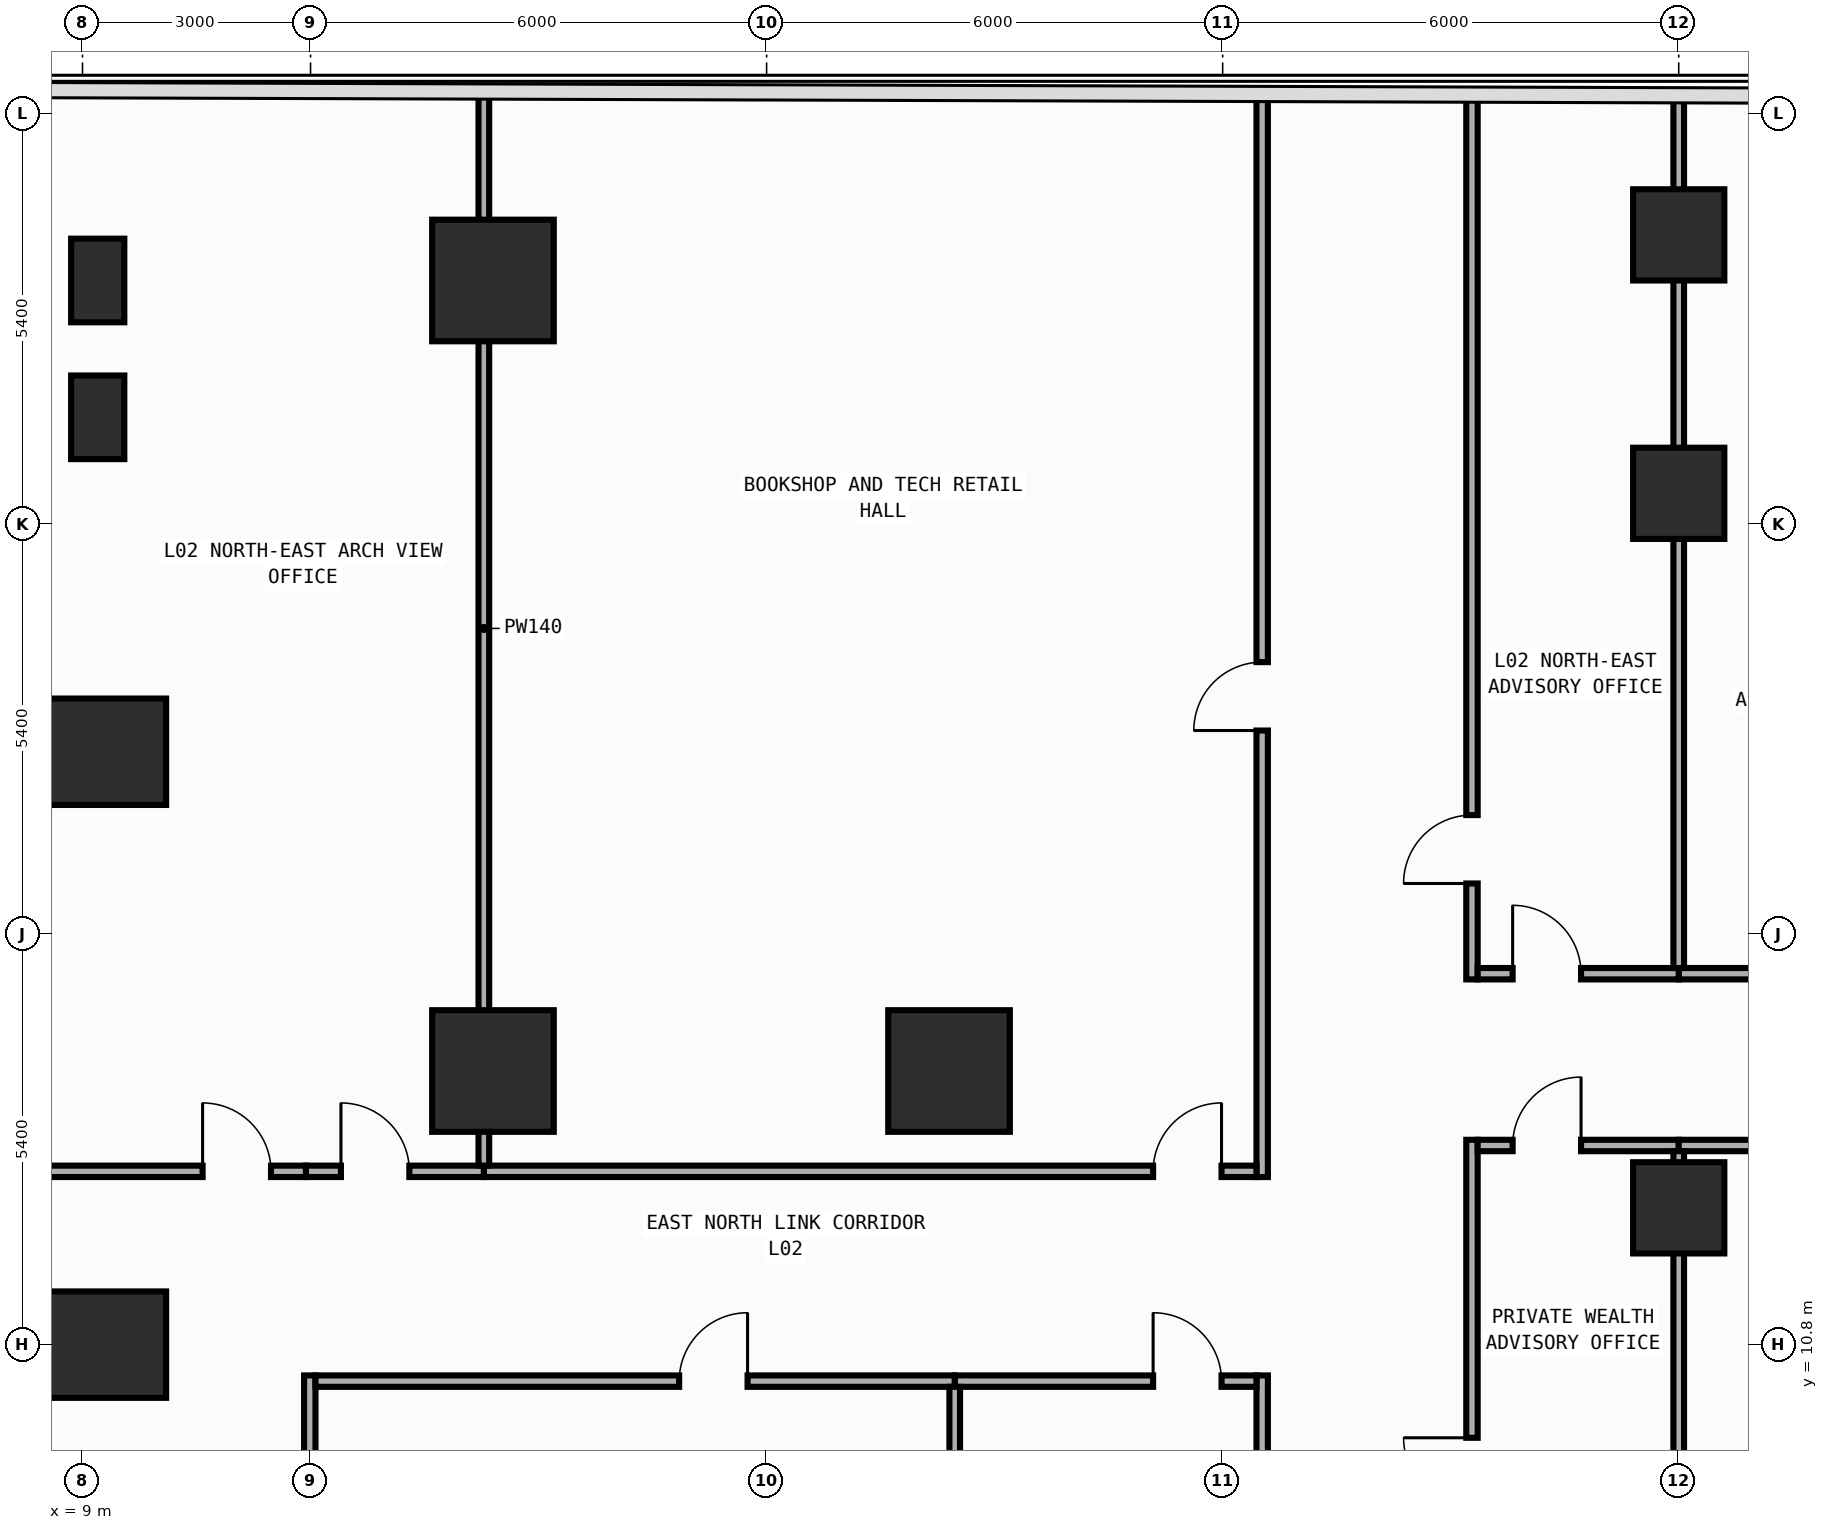
"""IFC4 building model, lengths in metres.
Left out: names, types, materials, properties, quantities, classifications, styles, units other than length and angle.
Written with IfcOpenShell. Run it as: python <this file> out.ifc"""

import sys

from ifc_helpers import new_model, si_unit, direction, frame, frame_2d, origin, origin_2d, place, context, subcontext, project, spatial, rectangle, extrude, element, fill, save


model = new_model("IFC4")
c1 = context("Model", 3, precision=1e-05, world=origin(), true_north=direction((0.0, 1.0)))
c2 = subcontext(c1, "Body", "Model", "MODEL_VIEW")
j1 = project(units=[si_unit("LENGTHUNIT", "METRE"), si_unit("PLANEANGLEUNIT", "RADIAN")], contexts=[c1])
p1 = place(None, origin())
s1 = spatial("IfcSite", under=j1, at=p1, CompositionType="ELEMENT")
p2 = place(p1, origin())
s2 = spatial("IfcBuilding", under=s1, at=p2, CompositionType="ELEMENT")
p3 = place(p2, frame((0.0, 0.0, 6.0)))
s3 = spatial("IfcBuildingStorey", under=s2, at=p3, CompositionType="ELEMENT", Elevation=6.0)
for number, where, z_axis, x_axis in (
    (1, (9.2, 10.8, 0.0), (0.0, 0.0, 1.0), (1.0, 0.0, 0.0)),
    (2, (9.2, 18.6, 0.0), (0.0, 0.0, 1.0), (1.0, 0.0, 0.0)),
):
    element("IfcColumn", number, at=place(p3, frame(where, z_axis=z_axis, x_axis=x_axis)), inside=s3, PredefinedType="COLUMN", context=c2, shape_type="SweptSolid", body=[
        extrude(rectangle(XDim=1.8, YDim=1.4, at=origin_2d()), origin(), (0.0, 0.0, 1.0), 5.0),
    ])
for number, where, z_axis, x_axis in (
    (3, (20.4, 14.4, 0.0), (0.0, 0.0, 1.0), (1.0, 0.0, 0.0)),
    (4, (14.4, 14.4, 0.0), (0.0, 0.0, 1.0), (1.0, 0.0, 0.0)),
):
    element("IfcColumn", number, at=place(p3, frame(where, z_axis=z_axis, x_axis=x_axis)), inside=s3, PredefinedType="COLUMN", context=c2, shape_type="SweptSolid", body=[
        extrude(rectangle(XDim=1.6, YDim=1.6, at=origin_2d()), origin(), (0.0, 0.0, 1.0), 5.0),
    ])
for number, where, z_axis, x_axis in (
    (5, (30.0, 12.6, 0.0), (0.0, 0.0, 1.0), (1.0, 0.0, 0.0)),
    (6, (30.0, 22.0, 0.0), (0.0, 0.0, 1.0), (1.0, 0.0, 0.0)),
    (7, (30.0, 25.4, 0.0), (0.0, 0.0, 1.0), (1.0, 0.0, 0.0)),
):
    element("IfcColumn", number, at=place(p3, frame(where, z_axis=z_axis, x_axis=x_axis)), inside=s3, PredefinedType="COLUMN", context=c2, shape_type="SweptSolid", body=[
        extrude(rectangle(XDim=1.2, YDim=1.2, at=origin_2d()), origin(), (0.0, 0.0, 1.0), 5.0),
    ])
p4 = place(p3, frame((9.2, 24.8, 0.0), z_axis=(0.0, 0.0, 1.0), x_axis=(1.0, 0.0, 0.0)))
e8 = element("IfcColumn", 8, at=p4, inside=s3, PredefinedType="PILASTER", context=c2, shape_type="SweptSolid", body=[
    extrude(rectangle(XDim=0.7, YDim=1.1, at=origin_2d()), origin(), (0.0, 0.0, 1.0), 5.0),
])
p5 = place(p3, frame((14.4, 24.8, 0.0), z_axis=(0.0, 0.0, 1.0), x_axis=(1.0, 0.0, 0.0)))
e9 = element("IfcColumn", 9, at=p5, inside=s3, PredefinedType="COLUMN", context=c2, shape_type="SweptSolid", body=[
    extrude(rectangle(XDim=1.6, YDim=1.6, at=origin_2d()), origin(), (0.0, 0.0, 1.0), 5.0),
])
p6 = place(p3, frame((9.2, 23.0, 0.0), z_axis=(0.0, 0.0, 1.0), x_axis=(1.0, 0.0, 0.0)))
e10 = element("IfcColumn", 10, at=p6, inside=s3, PredefinedType="PILASTER", context=c2, shape_type="SweptSolid", body=[
    extrude(rectangle(XDim=0.7, YDim=1.1, at=origin_2d()), origin(), (0.0, 0.0, 1.0), 5.0),
])
p7 = place(p3, frame((11.99, 7.2, 0.0), z_axis=(0.0, 0.0, 1.0), x_axis=(0.0, 1.0, 0.0)))
e11 = element("IfcWall", 11, at=p7, inside=s3, PredefinedType="PARTITIONING", context=c2, shape_type="SweptSolid", body=[
    extrude(rectangle(XDim=3.195, YDim=0.15, at=frame_2d((1.598, 0.0))), origin(), (0.0, 0.0, 1.0), 4.7),
])
p8 = place(p7, frame((0.689, 0.0, 0.0)))
e12 = element("IfcOpeningElement", 12, at=p8, cuts=e11, PredefinedType="OPENING", context=c2, shape_type="SweptSolid", body=[
    extrude(rectangle(XDim=0.9, YDim=2.15, at=frame_2d((0.45, 1.075))), frame((0.0, 0.085, 0.0), z_axis=(0.0, -1.0, 0.0), x_axis=(1.0, 0.0, 0.0)), (0.0, 0.0, 1.0), 0.17),
])
p9 = place(p3, frame((8.205, 13.08, 0.0), z_axis=(0.0, 0.0, 1.0), x_axis=(1.0, 0.0, 0.0)))
e13 = element("IfcWall", 13, at=p9, inside=s3, PredefinedType="PARTITIONING", context=c2, shape_type="SweptSolid", body=[
    extrude(rectangle(XDim=3.735, YDim=0.15, at=frame_2d((1.867, 0.0))), origin(), (0.0, 0.0, 1.0), 4.7),
])
p10 = place(p9, frame((2.375, 0.0, 0.0)))
e14 = element("IfcOpeningElement", 14, at=p10, cuts=e13, PredefinedType="OPENING", context=c2, shape_type="SweptSolid", body=[
    extrude(rectangle(XDim=0.9, YDim=2.15, at=frame_2d((0.45, 1.075))), frame((0.0, 0.085, 0.0), z_axis=(0.0, -1.0, 0.0), x_axis=(1.0, 0.0, 0.0)), (0.0, 0.0, 1.0), 0.17),
])
p11 = place(p3, frame((27.28, 5.365, 0.0), z_axis=(0.0, 0.0, 1.0), x_axis=(0.0, 1.0, 0.0)))
e15 = element("IfcWall", 15, at=p11, inside=s3, PredefinedType="PARTITIONING", context=c2, shape_type="SweptSolid", body=[
    extrude(rectangle(XDim=8.13, YDim=0.15, at=frame_2d((4.065, 0.0))), origin(), (0.0, 0.0, 1.0), 4.7),
])
p12 = place(p11, frame((3.31, 0.0, 0.0)))
e16 = element("IfcOpeningElement", 16, at=p12, cuts=e15, PredefinedType="OPENING", context=c2, shape_type="SweptSolid", body=[
    extrude(rectangle(XDim=0.9, YDim=2.15, at=frame_2d((0.45, 1.075))), frame((0.0, 0.085, 0.0), z_axis=(0.0, -1.0, 0.0), x_axis=(1.0, 0.0, 0.0)), (0.0, 0.0, 1.0), 0.17),
])
p13 = place(p3, frame((24.52, 13.005, 0.0), z_axis=(0.0, 0.0, 1.0), x_axis=(0.0, 1.0, 0.0)))
e17 = element("IfcWall", 17, at=p13, inside=s3, PredefinedType="PARTITIONING", context=c2, shape_type="SweptSolid", body=[
    extrude(rectangle(XDim=14.253, YDim=0.15, at=frame_2d((7.126, 0.0))), origin(), (0.0, 0.0, 1.0), 4.7),
])
p14 = place(p13, frame((5.874, 0.0, 0.0)))
e18 = element("IfcOpeningElement", 18, at=p14, cuts=e17, PredefinedType="OPENING", context=c2, shape_type="SweptSolid", body=[
    extrude(rectangle(XDim=0.9, YDim=2.15, at=frame_2d((0.45, 1.075))), frame((0.0, 0.085, 0.0), z_axis=(0.0, -1.0, 0.0), x_axis=(1.0, 0.0, 0.0)), (0.0, 0.0, 1.0), 0.17),
])
p15 = place(p3, frame((24.52, -20.88, 0.0), z_axis=(0.0, 0.0, 1.0), x_axis=(0.0, 1.0, 0.0)))
e19 = element("IfcWall", 19, at=p15, inside=s3, PredefinedType="PARTITIONING", context=c2, shape_type="SweptSolid", body=[
    extrude(rectangle(XDim=31.275, YDim=0.15, at=frame_2d((15.637, 0.0))), origin(), (0.0, 0.0, 1.0), 4.7),
])
p16 = place(p15, frame((15.087, 0.0, 0.0)))
e20 = element("IfcOpeningElement", 20, at=p16, cuts=e19, PredefinedType="OPENING", context=c2, shape_type="SweptSolid", body=[
    extrude(rectangle(XDim=0.9, YDim=2.15, at=frame_2d((0.45, 1.075))), frame((0.0, 0.085, 0.0), z_axis=(0.0, -1.0, 0.0), x_axis=(1.0, 0.0, 0.0)), (0.0, 0.0, 1.0), 0.17),
])
p17 = place(p3, frame((27.28, 15.605, 0.0), z_axis=(0.0, 0.0, 1.0), x_axis=(0.0, 1.0, 0.0)))
e21 = element("IfcWall", 21, at=p17, inside=s3, PredefinedType="PARTITIONING", context=c2, shape_type="SweptSolid", body=[
    extrude(rectangle(XDim=11.644, YDim=0.15, at=frame_2d((5.822, 0.0))), origin(), (0.0, 0.0, 1.0), 4.7),
])
p18 = place(p17, frame((1.262, 0.0, 0.0)))
e22 = element("IfcOpeningElement", 22, at=p18, cuts=e21, PredefinedType="OPENING", context=c2, shape_type="SweptSolid", body=[
    extrude(rectangle(XDim=0.9, YDim=2.15, at=frame_2d((0.45, 1.075))), frame((0.0, 0.085, 0.0), z_axis=(0.0, -1.0, 0.0), x_axis=(1.0, 0.0, 0.0)), (0.0, 0.0, 1.0), 0.17),
])
p19 = place(p3, frame((27.355, 13.42, 0.0), z_axis=(0.0, 0.0, 1.0), x_axis=(1.0, 0.0, 0.0)))
e23 = element("IfcWall", 23, at=p19, inside=s3, PredefinedType="PARTITIONING", context=c2, shape_type="SweptSolid", body=[
    extrude(rectangle(XDim=2.645, YDim=0.15, at=frame_2d((1.323, 0.0))), origin(), (0.0, 0.0, 1.0), 4.7),
])
p20 = place(p19, frame((0.46, 0.0, 0.0)))
e24 = element("IfcOpeningElement", 24, at=p20, cuts=e23, PredefinedType="OPENING", context=c2, shape_type="SweptSolid", body=[
    extrude(rectangle(XDim=0.9, YDim=2.15, at=frame_2d((0.45, 1.075))), frame((0.0, 0.085, 0.0), z_axis=(0.0, -1.0, 0.0), x_axis=(1.0, 0.0, 0.0)), (0.0, 0.0, 1.0), 0.17),
])
p21 = place(p3, frame((30.0, 13.42, 0.0), z_axis=(0.0, 0.0, 1.0), x_axis=(1.0, 0.0, 0.0)))
e25 = element("IfcWall", 25, at=p21, inside=s3, PredefinedType="PARTITIONING", context=c2, shape_type="SweptSolid", body=[
    extrude(rectangle(XDim=6.445, YDim=0.15, at=frame_2d((3.223, 0.0))), origin(), (0.0, 0.0, 1.0), 4.7),
])
p22 = place(p21, frame((1.667, 0.0, 0.0)))
e26 = element("IfcOpeningElement", 26, at=p22, cuts=e25, PredefinedType="OPENING", context=c2, shape_type="SweptSolid", body=[
    extrude(rectangle(XDim=0.9, YDim=2.15, at=frame_2d((0.45, 1.075))), frame((0.0, 0.085, 0.0), z_axis=(0.0, -1.0, 0.0), x_axis=(1.0, 0.0, 0.0)), (0.0, 0.0, 1.0), 0.17),
])
p23 = place(p3, frame((30.0, 15.68, 0.0), z_axis=(0.0, 0.0, 1.0), x_axis=(1.0, 0.0, 0.0)))
e27 = element("IfcWall", 27, at=p23, inside=s3, PredefinedType="PARTITIONING", context=c2, shape_type="SweptSolid", body=[
    extrude(rectangle(XDim=6.445, YDim=0.15, at=frame_2d((3.223, 0.0))), origin(), (0.0, 0.0, 1.0), 4.7),
])
p24 = place(p23, frame((1.667, 0.0, 0.0)))
e28 = element("IfcOpeningElement", 28, at=p24, cuts=e27, PredefinedType="OPENING", context=c2, shape_type="SweptSolid", body=[
    extrude(rectangle(XDim=0.9, YDim=2.15, at=frame_2d((0.45, 1.075))), frame((0.0, 0.085, 0.0), z_axis=(0.0, -1.0, 0.0), x_axis=(1.0, 0.0, 0.0)), (0.0, 0.0, 1.0), 0.17),
])
p25 = place(p3, frame((27.355, 15.68, 0.0), z_axis=(0.0, 0.0, 1.0), x_axis=(1.0, 0.0, 0.0)))
e29 = element("IfcWall", 29, at=p25, inside=s3, PredefinedType="PARTITIONING", context=c2, shape_type="SweptSolid", body=[
    extrude(rectangle(XDim=2.645, YDim=0.15, at=frame_2d((1.323, 0.0))), origin(), (0.0, 0.0, 1.0), 4.7),
])
p26 = place(p25, frame((0.46, 0.0, 0.0)))
e30 = element("IfcOpeningElement", 30, at=p26, cuts=e29, PredefinedType="OPENING", context=c2, shape_type="SweptSolid", body=[
    extrude(rectangle(XDim=0.9, YDim=2.15, at=frame_2d((0.45, 1.075))), frame((0.0, 0.085, 0.0), z_axis=(0.0, -1.0, 0.0), x_axis=(1.0, 0.0, 0.0)), (0.0, 0.0, 1.0), 0.17),
])
p27 = place(p3, frame((14.28, 13.08, 0.0), z_axis=(0.0, 0.0, 1.0), x_axis=(1.0, 0.0, 0.0)))
e31 = element("IfcWall", 31, at=p27, inside=s3, PredefinedType="PARTITIONING", context=c2, shape_type="SweptSolid", body=[
    extrude(rectangle(XDim=10.165, YDim=0.15, at=frame_2d((5.083, 0.0))), origin(), (0.0, 0.0, 1.0), 4.7),
])
p28 = place(p27, frame((8.805, 0.0, 0.0)))
e32 = element("IfcOpeningElement", 32, at=p28, cuts=e31, PredefinedType="OPENING", context=c2, shape_type="SweptSolid", body=[
    extrude(rectangle(XDim=0.9, YDim=2.15, at=frame_2d((0.45, 1.075))), frame((0.0, 0.085, 0.0), z_axis=(0.0, -1.0, 0.0), x_axis=(1.0, 0.0, 0.0)), (0.0, 0.0, 1.0), 0.17),
])
p29 = place(p3, frame((20.475, 10.32, 0.0), z_axis=(0.0, 0.0, 1.0), x_axis=(1.0, 0.0, 0.0)))
e33 = element("IfcWall", 33, at=p29, inside=s3, PredefinedType="PARTITIONING", context=c2, shape_type="SweptSolid", body=[
    extrude(rectangle(XDim=3.97, YDim=0.15, at=frame_2d((1.985, 0.0))), origin(), (0.0, 0.0, 1.0), 4.7),
])
p30 = place(p29, frame((2.61, 0.0, 0.0)))
e34 = element("IfcOpeningElement", 34, at=p30, cuts=e33, PredefinedType="OPENING", context=c2, shape_type="SweptSolid", body=[
    extrude(rectangle(XDim=0.9, YDim=2.15, at=frame_2d((0.45, 1.075))), frame((0.0, 0.085, 0.0), z_axis=(0.0, -1.0, 0.0), x_axis=(1.0, 0.0, 0.0)), (0.0, 0.0, 1.0), 0.17),
])
p31 = place(p3, frame((12.065, 10.32, 0.0), z_axis=(0.0, 0.0, 1.0), x_axis=(1.0, 0.0, 0.0)))
e35 = element("IfcWall", 35, at=p31, inside=s3, PredefinedType="PARTITIONING", context=c2, shape_type="SweptSolid", body=[
    extrude(rectangle(XDim=8.41, YDim=0.15, at=frame_2d((4.205, 0.0))), origin(), (0.0, 0.0, 1.0), 4.7),
])
p32 = place(p31, frame((4.785, 0.0, 0.0)))
e36 = element("IfcOpeningElement", 36, at=p32, cuts=e35, PredefinedType="OPENING", context=c2, shape_type="SweptSolid", body=[
    extrude(rectangle(XDim=0.9, YDim=2.15, at=frame_2d((0.45, 1.075))), frame((0.0, 0.085, 0.0), z_axis=(0.0, -1.0, 0.0), x_axis=(1.0, 0.0, 0.0)), (0.0, 0.0, 1.0), 0.17),
])
p33 = place(p3, frame((11.94, 13.08, 0.0), z_axis=(0.0, 0.0, 1.0), x_axis=(1.0, 0.0, 0.0)))
e37 = element("IfcWall", 37, at=p33, inside=s3, PredefinedType="PARTITIONING", context=c2, shape_type="SweptSolid", body=[
    extrude(rectangle(XDim=2.34, YDim=0.15, at=frame_2d((1.17, 0.0))), origin(), (0.0, 0.0, 1.0), 4.7),
])
p34 = place(p33, frame((0.46, 0.0, 0.0)))
e38 = element("IfcOpeningElement", 38, at=p34, cuts=e37, PredefinedType="OPENING", context=c2, shape_type="SweptSolid", body=[
    extrude(rectangle(XDim=0.9, YDim=2.15, at=frame_2d((0.45, 1.075))), frame((0.0, 0.085, 0.0), z_axis=(0.0, -1.0, 0.0), x_axis=(1.0, 0.0, 0.0)), (0.0, 0.0, 1.0), 0.17),
])
p35 = place(p3, frame((30.0, 5.515, 0.0), z_axis=(0.0, 0.0, 1.0), x_axis=(0.0, 1.0, 0.0)))
e39 = element("IfcWall", 39, at=p35, inside=s3, PredefinedType="PARTITIONING", context=c2, shape_type="SweptSolid", body=[
    extrude(rectangle(XDim=7.83, YDim=0.14, at=frame_2d((3.915, 0.0))), origin(), (0.0, 0.0, 1.0), 3.8),
])
p36 = place(p3, frame((30.0, 15.755, 0.0), z_axis=(0.0, 0.0, 1.0), x_axis=(0.0, 1.0, 0.0)))
e40 = element("IfcWall", 40, at=p36, inside=s3, PredefinedType="PARTITIONING", context=c2, shape_type="SweptSolid", body=[
    extrude(rectangle(XDim=11.486, YDim=0.14, at=frame_2d((5.743, 0.0))), origin(), (0.0, 0.0, 1.0), 3.8),
])
p37 = place(p3, frame((14.28, 13.155, 0.0), z_axis=(0.0, 0.0, 1.0), x_axis=(0.0, 1.0, 0.0)))
e41 = element("IfcWall", 41, at=p37, inside=s3, PredefinedType="PARTITIONING", context=c2, shape_type="SweptSolid", body=[
    extrude(rectangle(XDim=14.135, YDim=0.14, at=frame_2d((7.067, 0.0))), origin(), (0.0, 0.0, 1.0), 3.8),
])
p38 = place(p3, frame((20.475, 7.2, 0.0), z_axis=(0.0, 0.0, 1.0), x_axis=(0.0, 1.0, 0.0)))
e42 = element("IfcWall", 42, at=p38, inside=s3, PredefinedType="PARTITIONING", context=c2, shape_type="SweptSolid", body=[
    extrude(rectangle(XDim=3.045, YDim=0.14, at=frame_2d((1.522, 0.0))), origin(), (0.0, 0.0, 1.0), 4.7),
])
p39 = place(p10, origin())
e43 = element("IfcDoor", 43, at=p39, inside=s3, OperationType="SINGLE_SWING_LEFT", PredefinedType="DOOR", context=c2, shape_type="SweptSolid", body=[
    extrude(rectangle(XDim=0.9, YDim=2.15, at=frame_2d((0.45, 1.075))), frame((0.0, 0.025, 0.0), z_axis=(0.0, -1.0, 0.0), x_axis=(1.0, 0.0, 0.0)), (0.0, 0.0, 1.0), 0.05),
])
fill(e14, e43)
p40 = place(p12, origin())
e44 = element("IfcDoor", 44, at=p40, inside=s3, OperationType="SINGLE_SWING_RIGHT", PredefinedType="DOOR", context=c2, shape_type="SweptSolid", body=[
    extrude(rectangle(XDim=0.9, YDim=2.15, at=frame_2d((0.45, 1.075))), frame((0.0, 0.025, 0.0), z_axis=(0.0, -1.0, 0.0), x_axis=(1.0, 0.0, 0.0)), (0.0, 0.0, 1.0), 0.05),
])
fill(e16, e44)
p41 = place(p14, origin())
e45 = element("IfcDoor", 45, at=p41, inside=s3, OperationType="SINGLE_SWING_LEFT", PredefinedType="DOOR", context=c2, shape_type="SweptSolid", body=[
    extrude(rectangle(XDim=0.9, YDim=2.15, at=frame_2d((0.45, 1.075))), frame((0.0, 0.025, 0.0), z_axis=(0.0, -1.0, 0.0), x_axis=(1.0, 0.0, 0.0)), (0.0, 0.0, 1.0), 0.05),
])
fill(e18, e45)
p42 = place(p18, origin())
e46 = element("IfcDoor", 46, at=p42, inside=s3, OperationType="SINGLE_SWING_LEFT", PredefinedType="DOOR", context=c2, shape_type="SweptSolid", body=[
    extrude(rectangle(XDim=0.9, YDim=2.15, at=frame_2d((0.45, 1.075))), frame((0.0, 0.025, 0.0), z_axis=(0.0, -1.0, 0.0), x_axis=(1.0, 0.0, 0.0)), (0.0, 0.0, 1.0), 0.05),
])
fill(e22, e46)
p43 = place(p20, origin())
e47 = element("IfcDoor", 47, at=p43, inside=s3, OperationType="SINGLE_SWING_RIGHT", PredefinedType="DOOR", context=c2, shape_type="SweptSolid", body=[
    extrude(rectangle(XDim=0.9, YDim=2.15, at=frame_2d((0.45, 1.075))), frame((0.0, 0.025, 0.0), z_axis=(0.0, -1.0, 0.0), x_axis=(1.0, 0.0, 0.0)), (0.0, 0.0, 1.0), 0.05),
])
fill(e24, e47)
p44 = place(p26, origin())
e48 = element("IfcDoor", 48, at=p44, inside=s3, OperationType="SINGLE_SWING_LEFT", PredefinedType="DOOR", context=c2, shape_type="SweptSolid", body=[
    extrude(rectangle(XDim=0.9, YDim=2.15, at=frame_2d((0.45, 1.075))), frame((0.0, 0.025, 0.0), z_axis=(0.0, -1.0, 0.0), x_axis=(1.0, 0.0, 0.0)), (0.0, 0.0, 1.0), 0.05),
])
fill(e30, e48)
p45 = place(p28, origin())
e49 = element("IfcDoor", 49, at=p45, inside=s3, OperationType="SINGLE_SWING_RIGHT", PredefinedType="DOOR", context=c2, shape_type="SweptSolid", body=[
    extrude(rectangle(XDim=0.9, YDim=2.15, at=frame_2d((0.45, 1.075))), frame((0.0, 0.025, 0.0), z_axis=(0.0, -1.0, 0.0), x_axis=(1.0, 0.0, 0.0)), (0.0, 0.0, 1.0), 0.05),
])
fill(e32, e49)
p46 = place(p30, origin())
e50 = element("IfcDoor", 50, at=p46, inside=s3, OperationType="SINGLE_SWING_LEFT", PredefinedType="DOOR", context=c2, shape_type="SweptSolid", body=[
    extrude(rectangle(XDim=0.9, YDim=2.15, at=frame_2d((0.45, 1.075))), frame((0.0, 0.025, 0.0), z_axis=(0.0, -1.0, 0.0), x_axis=(1.0, 0.0, 0.0)), (0.0, 0.0, 1.0), 0.05),
])
fill(e34, e50)
p47 = place(p32, origin())
e51 = element("IfcDoor", 51, at=p47, inside=s3, OperationType="SINGLE_SWING_RIGHT", PredefinedType="DOOR", context=c2, shape_type="SweptSolid", body=[
    extrude(rectangle(XDim=0.9, YDim=2.15, at=frame_2d((0.45, 1.075))), frame((0.0, 0.025, 0.0), z_axis=(0.0, -1.0, 0.0), x_axis=(1.0, 0.0, 0.0)), (0.0, 0.0, 1.0), 0.05),
])
fill(e36, e51)
p48 = place(p34, origin())
e52 = element("IfcDoor", 52, at=p48, inside=s3, OperationType="SINGLE_SWING_LEFT", PredefinedType="DOOR", context=c2, shape_type="SweptSolid", body=[
    extrude(rectangle(XDim=0.9, YDim=2.15, at=frame_2d((0.45, 1.075))), frame((0.0, 0.025, 0.0), z_axis=(0.0, -1.0, 0.0), x_axis=(1.0, 0.0, 0.0)), (0.0, 0.0, 1.0), 0.05),
])
fill(e38, e52)
save(model, sys.argv[1])
